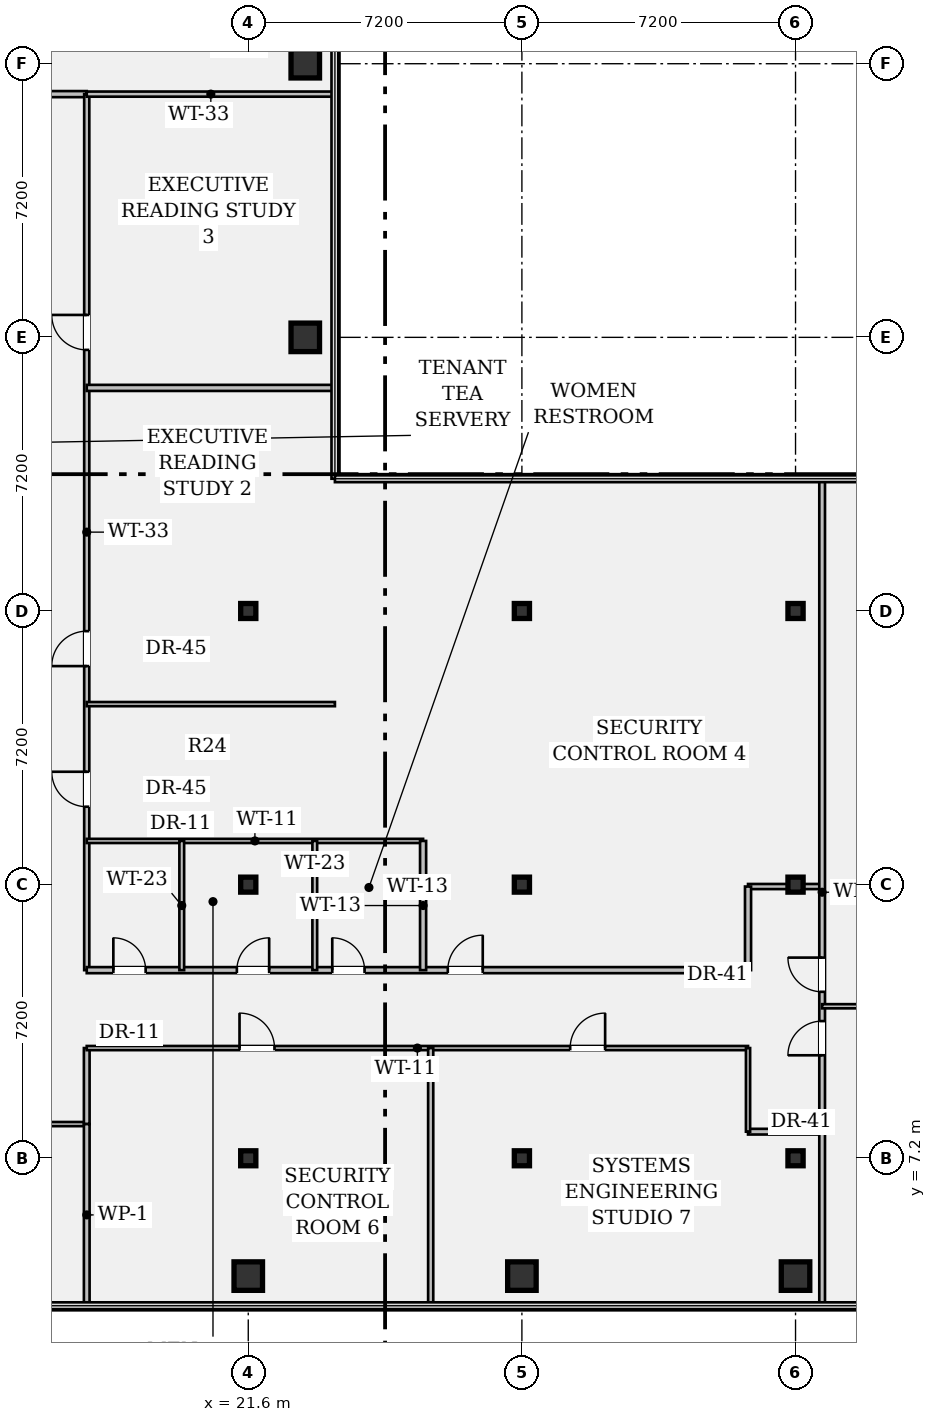
"""IFC4 building model, lengths in metres.
Left out: names, types, materials, properties, quantities, classifications, styles, units other than length and angle.
Written with IfcOpenShell. Run it as: python <this file> out.ifc"""

import sys

from ifc_helpers import new_model, si_unit, direction, frame, frame_2d, origin, origin_2d, place, context, subcontext, project, spatial, rectangle, hollow_rectangle, i_section, extrude, element, fill, save


model = new_model("IFC4")
c1 = context("Model", 3, precision=1e-05, world=origin(), true_north=direction((0.0, 1.0)))
c2 = subcontext(c1, "Body", "Model", "MODEL_VIEW")
j1 = project(units=[si_unit("LENGTHUNIT", "METRE"), si_unit("PLANEANGLEUNIT", "RADIAN")], contexts=[c1])
p1 = place(None, origin())
s1 = spatial("IfcSite", under=j1, at=p1, CompositionType="ELEMENT")
p2 = place(p1, origin())
s2 = spatial("IfcBuilding", under=s1, at=p2, CompositionType="ELEMENT")
p3 = place(p2, frame((0.0, 0.0, 229.25)))
s3 = spatial("IfcBuildingStorey", under=s2, at=p3, CompositionType="ELEMENT", Elevation=229.25)
p4 = place(p3, frame((21.6, 4.1, 0.0), z_axis=(0.0, 0.0, 1.0), x_axis=(1.0, 0.0, 0.0)))
e1 = element("IfcColumn", 1, at=p4, inside=s3, PredefinedType="COLUMN", context=c2, shape_type="SweptSolid", body=[
    extrude(hollow_rectangle(XDim=0.75, YDim=0.75, WallThickness=0.045, at=origin_2d()), origin(), (0.0, 0.0, 1.0), 3.24),
])
for number, where, z_axis, x_axis in (
    (2, (21.6, 7.2, 0.0), (0.0, 0.0, 1.0), (1.0, 0.0, 0.0)),
    (3, (21.6, 14.4, 0.0), (0.0, 0.0, 1.0), (1.0, 0.0, 0.0)),
    (4, (21.6, 21.6, 0.0), (0.0, 0.0, 1.0), (1.0, 0.0, 0.0)),
):
    element("IfcColumn", number, at=place(p3, frame(where, z_axis=z_axis, x_axis=x_axis)), inside=s3, PredefinedType="COLUMN", context=c2, shape_type="SweptSolid", body=[
        extrude(i_section(OverallWidth=0.399, OverallDepth=0.394, WebThickness=0.023, FlangeThickness=0.037, FilletRadius=0.018, at=origin_2d()), origin(), (0.0, 0.0, 1.0), 3.24),
    ])
for number, where, z_axis, x_axis in (
    (5, (23.1, 28.8, 0.0), (0.0, 0.0, 1.0), (1.0, 0.0, 0.0)),
    (6, (23.1, 36.0, 0.0), (0.0, 0.0, 1.0), (1.0, 0.0, 0.0)),
    (7, (28.8, 4.1, 0.0), (0.0, 0.0, 1.0), (1.0, 0.0, 0.0)),
):
    element("IfcColumn", number, at=place(p3, frame(where, z_axis=z_axis, x_axis=x_axis)), inside=s3, PredefinedType="COLUMN", context=c2, shape_type="SweptSolid", body=[
        extrude(hollow_rectangle(XDim=0.75, YDim=0.75, WallThickness=0.045, at=origin_2d()), origin(), (0.0, 0.0, 1.0), 3.24),
    ])
for number, where, z_axis, x_axis in (
    (8, (28.8, 7.2, 0.0), (0.0, 0.0, 1.0), (1.0, 0.0, 0.0)),
    (9, (28.8, 14.4, 0.0), (0.0, 0.0, 1.0), (1.0, 0.0, 0.0)),
    (10, (28.8, 21.6, 0.0), (0.0, 0.0, 1.0), (1.0, 0.0, 0.0)),
):
    element("IfcColumn", number, at=place(p3, frame(where, z_axis=z_axis, x_axis=x_axis)), inside=s3, PredefinedType="COLUMN", context=c2, shape_type="SweptSolid", body=[
        extrude(i_section(OverallWidth=0.399, OverallDepth=0.394, WebThickness=0.023, FlangeThickness=0.037, FilletRadius=0.018, at=origin_2d()), origin(), (0.0, 0.0, 1.0), 3.24),
    ])
p5 = place(p3, frame((36.0, 4.1, 0.0), z_axis=(0.0, 0.0, 1.0), x_axis=(1.0, 0.0, 0.0)))
e11 = element("IfcColumn", 11, at=p5, inside=s3, PredefinedType="COLUMN", context=c2, shape_type="SweptSolid", body=[
    extrude(hollow_rectangle(XDim=0.75, YDim=0.75, WallThickness=0.045, at=origin_2d()), origin(), (0.0, 0.0, 1.0), 3.24),
])
for number, where, z_axis, x_axis in (
    (12, (36.0, 7.2, 0.0), (0.0, 0.0, 1.0), (1.0, 0.0, 0.0)),
    (13, (36.0, 14.4, 0.0), (0.0, 0.0, 1.0), (1.0, 0.0, 0.0)),
    (14, (36.0, 21.6, 0.0), (0.0, 0.0, 1.0), (1.0, 0.0, 0.0)),
):
    element("IfcColumn", number, at=place(p3, frame(where, z_axis=z_axis, x_axis=x_axis)), inside=s3, PredefinedType="COLUMN", context=c2, shape_type="SweptSolid", body=[
        extrude(i_section(OverallWidth=0.399, OverallDepth=0.394, WebThickness=0.023, FlangeThickness=0.037, FilletRadius=0.018, at=origin_2d()), origin(), (0.0, 0.0, 1.0), 3.24),
    ])
p6 = place(p3, frame((14.4, 8.1, 0.0), z_axis=(0.0, 0.0, 1.0), x_axis=(1.0, 0.0, 0.0)))
e15 = element("IfcWall", 15, at=p6, inside=s3, PredefinedType="PARTITIONING", context=c2, shape_type="SweptSolid", body=[
    extrude(rectangle(XDim=2.95, YDim=0.11, at=frame_2d((1.475, 0.0))), origin(), (0.0, 0.0, 1.0), 2.808),
])
p7 = place(p6, frame((0.95, 0.0, 0.0)))
e16 = element("IfcOpeningElement", 16, at=p7, cuts=e15, PredefinedType="OPENING", context=c2, shape_type="SweptSolid", body=[
    extrude(rectangle(XDim=0.92, YDim=2.15, at=frame_2d((0.46, 1.075))), frame((0.0, 0.067, 0.0), z_axis=(0.0, -1.0, 0.0), x_axis=(1.0, 0.0, 0.0)), (0.0, 0.0, 1.0), 0.134),
])
p8 = place(p3, frame((14.4, 35.2, 0.0), z_axis=(0.0, 0.0, 1.0), x_axis=(1.0, 0.0, 0.0)))
e17 = element("IfcWall", 17, at=p8, inside=s3, PredefinedType="PARTITIONING", context=c2, shape_type="SweptSolid", body=[
    extrude(rectangle(XDim=2.95, YDim=0.16, at=frame_2d((1.475, 0.0))), origin(), (0.0, 0.0, 1.0), 2.808),
])
p9 = place(p8, frame((0.95, 0.0, 0.0)))
e18 = element("IfcOpeningElement", 18, at=p9, cuts=e17, PredefinedType="OPENING", context=c2, shape_type="SweptSolid", body=[
    extrude(rectangle(XDim=1.0, YDim=2.15, at=frame_2d((0.5, 1.075))), frame((0.0, 0.092, 0.0), z_axis=(0.0, -1.0, 0.0), x_axis=(1.0, 0.0, 0.0)), (0.0, 0.0, 1.0), 0.184),
])
p10 = place(p3, frame((17.35, 8.1, 0.0), z_axis=(0.0, 0.0, 1.0), x_axis=(0.0, 1.0, 0.0)))
e19 = element("IfcWall", 19, at=p10, inside=s3, PredefinedType="PARTITIONING", context=c2, shape_type="SweptSolid", body=[
    extrude(rectangle(XDim=2.0, YDim=0.15, at=frame_2d((1.0, 0.0))), origin(), (0.0, 0.0, 1.0), 3.24),
])
p11 = place(p3, frame((17.35, 12.15, 0.0), z_axis=(0.0, 0.0, 1.0), x_axis=(0.0, 1.0, 0.0)))
e20 = element("IfcWall", 20, at=p11, inside=s3, PredefinedType="PARTITIONING", context=c2, shape_type="SweptSolid", body=[
    extrude(rectangle(XDim=23.05, YDim=0.135, at=frame_2d((11.525, 0.0))), origin(), (0.0, 0.0, 1.0), 2.325),
])
p12 = place(p11, frame((4.3, 0.0, 0.0)))
e21 = element("IfcOpeningElement", 21, at=p12, cuts=e20, PredefinedType="OPENING", context=c2, shape_type="SweptSolid", body=[
    extrude(rectangle(XDim=0.92, YDim=2.15, at=frame_2d((0.46, 1.075))), frame((0.0, 0.08, 0.0), z_axis=(0.0, -1.0, 0.0), x_axis=(1.0, 0.0, 0.0)), (0.0, 0.0, 1.0), 0.159),
])
p13 = place(p11, frame((8.0, 0.0, 0.0)))
e22 = element("IfcOpeningElement", 22, at=p13, cuts=e20, PredefinedType="OPENING", context=c2, shape_type="SweptSolid", body=[
    extrude(rectangle(XDim=0.92, YDim=2.15, at=frame_2d((0.46, 1.075))), frame((0.0, 0.08, 0.0), z_axis=(0.0, -1.0, 0.0), x_axis=(1.0, 0.0, 0.0)), (0.0, 0.0, 1.0), 0.159),
])
p14 = place(p11, frame((16.32, 0.0, 0.0)))
e23 = element("IfcOpeningElement", 23, at=p14, cuts=e20, PredefinedType="OPENING", context=c2, shape_type="SweptSolid", body=[
    extrude(rectangle(XDim=0.92, YDim=2.15, at=frame_2d((0.46, 1.075))), frame((0.0, 0.08, 0.0), z_axis=(0.0, -1.0, 0.0), x_axis=(1.0, 0.0, 0.0)), (0.0, 0.0, 1.0), 0.159),
])
p15 = place(p3, frame((17.35, 10.1, 0.0), z_axis=(0.0, 0.0, 1.0), x_axis=(1.0, 0.0, 0.0)))
e24 = element("IfcWall", 24, at=p15, inside=s3, PredefinedType="PARTITIONING", context=c2, shape_type="SweptSolid", body=[
    extrude(rectangle(XDim=17.4, YDim=0.11, at=frame_2d((8.7, 0.0))), origin(), (0.0, 0.0, 1.0), 2.325),
])
p16 = place(p15, frame((4.02, 0.0, 0.0)))
e25 = element("IfcOpeningElement", 25, at=p16, cuts=e24, PredefinedType="OPENING", context=c2, shape_type="SweptSolid", body=[
    extrude(rectangle(XDim=0.92, YDim=2.15, at=frame_2d((0.46, 1.075))), frame((0.0, 0.067, 0.0), z_axis=(0.0, -1.0, 0.0), x_axis=(1.0, 0.0, 0.0)), (0.0, 0.0, 1.0), 0.134),
])
p17 = place(p15, frame((12.72, 0.0, 0.0)))
e26 = element("IfcOpeningElement", 26, at=p17, cuts=e24, PredefinedType="OPENING", context=c2, shape_type="SweptSolid", body=[
    extrude(rectangle(XDim=0.92, YDim=2.15, at=frame_2d((0.46, 1.075))), frame((0.0, 0.067, 0.0), z_axis=(0.0, -1.0, 0.0), x_axis=(1.0, 0.0, 0.0)), (0.0, 0.0, 1.0), 0.134),
])
p18 = place(p3, frame((17.35, 12.15, 0.0), z_axis=(0.0, 0.0, 1.0), x_axis=(1.0, 0.0, 0.0)))
e27 = element("IfcWall", 27, at=p18, inside=s3, PredefinedType="PARTITIONING", context=c2, shape_type="SweptSolid", body=[
    extrude(rectangle(XDim=17.4, YDim=0.16, at=frame_2d((8.7, 0.0))), origin(), (0.0, 0.0, 1.0), 2.325),
])
p19 = place(p18, frame((0.7, 0.0, 0.0)))
e28 = element("IfcOpeningElement", 28, at=p19, cuts=e27, PredefinedType="OPENING", context=c2, shape_type="SweptSolid", body=[
    extrude(rectangle(XDim=0.85, YDim=2.15, at=frame_2d((0.425, 1.075))), frame((0.0, 0.092, 0.0), z_axis=(0.0, -1.0, 0.0), x_axis=(1.0, 0.0, 0.0)), (0.0, 0.0, 1.0), 0.184),
])
p20 = place(p18, frame((3.95, 0.0, 0.0)))
e29 = element("IfcOpeningElement", 29, at=p20, cuts=e27, PredefinedType="OPENING", context=c2, shape_type="SweptSolid", body=[
    extrude(rectangle(XDim=0.85, YDim=2.15, at=frame_2d((0.425, 1.075))), frame((0.0, 0.092, 0.0), z_axis=(0.0, -1.0, 0.0), x_axis=(1.0, 0.0, 0.0)), (0.0, 0.0, 1.0), 0.184),
])
p21 = place(p18, frame((6.46, 0.0, 0.0)))
e30 = element("IfcOpeningElement", 30, at=p21, cuts=e27, PredefinedType="OPENING", context=c2, shape_type="SweptSolid", body=[
    extrude(rectangle(XDim=0.85, YDim=2.15, at=frame_2d((0.425, 1.075))), frame((0.0, 0.092, 0.0), z_axis=(0.0, -1.0, 0.0), x_axis=(1.0, 0.0, 0.0)), (0.0, 0.0, 1.0), 0.184),
])
p22 = place(p18, frame((9.5, 0.0, 0.0)))
e31 = element("IfcOpeningElement", 31, at=p22, cuts=e27, PredefinedType="OPENING", context=c2, shape_type="SweptSolid", body=[
    extrude(rectangle(XDim=0.92, YDim=2.15, at=frame_2d((0.46, 1.075))), frame((0.0, 0.092, 0.0), z_axis=(0.0, -1.0, 0.0), x_axis=(1.0, 0.0, 0.0)), (0.0, 0.0, 1.0), 0.184),
])
p23 = place(p3, frame((34.75, 7.9, 0.0), z_axis=(0.0, 0.0, 1.0), x_axis=(1.0, 0.0, 0.0)))
e32 = element("IfcWall", 32, at=p23, inside=s3, PredefinedType="PARTITIONING", context=c2, shape_type="SweptSolid", body=[
    extrude(rectangle(XDim=1.95, YDim=0.15, at=frame_2d((0.975, 0.0))), origin(), (0.0, 0.0, 1.0), 2.325),
])
p24 = place(p3, frame((34.75, 14.35, 0.0), z_axis=(0.0, 0.0, 1.0), x_axis=(1.0, 0.0, 0.0)))
e33 = element("IfcWall", 33, at=p24, inside=s3, PredefinedType="PARTITIONING", context=c2, shape_type="SweptSolid", body=[
    extrude(rectangle(XDim=1.95, YDim=0.135, at=frame_2d((0.975, 0.0))), origin(), (0.0, 0.0, 1.0), 2.325),
])
p25 = place(p3, frame((34.75, 7.9, 0.0), z_axis=(0.0, 0.0, 1.0), x_axis=(0.0, 1.0, 0.0)))
e34 = element("IfcWall", 34, at=p25, inside=s3, PredefinedType="PARTITIONING", context=c2, shape_type="SweptSolid", body=[
    extrude(rectangle(XDim=2.2, YDim=0.11, at=frame_2d((1.1, 0.0))), origin(), (0.0, 0.0, 1.0), 3.24),
])
p26 = place(p3, frame((34.75, 12.15, 0.0), z_axis=(0.0, 0.0, 1.0), x_axis=(0.0, 1.0, 0.0)))
e35 = element("IfcWall", 35, at=p26, inside=s3, PredefinedType="PARTITIONING", context=c2, shape_type="SweptSolid", body=[
    extrude(rectangle(XDim=2.2, YDim=0.16, at=frame_2d((1.1, 0.0))), origin(), (0.0, 0.0, 1.0), 3.24),
])
p27 = place(p3, frame((36.7, 3.32, 0.0), z_axis=(0.0, 0.0, 1.0), x_axis=(0.0, 1.0, 0.0)))
e36 = element("IfcWall", 36, at=p27, inside=s3, PredefinedType="PARTITIONING", context=c2, shape_type="SweptSolid", body=[
    extrude(rectangle(XDim=21.76, YDim=0.15, at=frame_2d((10.88, 0.0))), origin(), (0.0, 0.0, 1.0), 2.325),
])
p28 = place(p27, frame((6.59, 0.0, 0.0)))
e37 = element("IfcOpeningElement", 37, at=p28, cuts=e36, PredefinedType="OPENING", context=c2, shape_type="SweptSolid", body=[
    extrude(rectangle(XDim=0.9, YDim=2.15, at=frame_2d((0.45, 1.075))), frame((0.0, 0.087, 0.0), z_axis=(0.0, -1.0, 0.0), x_axis=(1.0, 0.0, 0.0)), (0.0, 0.0, 1.0), 0.174),
])
p29 = place(p27, frame((8.26, 0.0, 0.0)))
e38 = element("IfcOpeningElement", 38, at=p29, cuts=e36, PredefinedType="OPENING", context=c2, shape_type="SweptSolid", body=[
    extrude(rectangle(XDim=0.9, YDim=2.15, at=frame_2d((0.45, 1.075))), frame((0.0, 0.087, 0.0), z_axis=(0.0, -1.0, 0.0), x_axis=(1.0, 0.0, 0.0)), (0.0, 0.0, 1.0), 0.174),
])
p30 = place(p3, frame((17.35, 35.2, 0.0), z_axis=(0.0, 0.0, 1.0), x_axis=(1.0, 0.0, 0.0)))
e39 = element("IfcWall", 39, at=p30, inside=s3, PredefinedType="PARTITIONING", context=c2, shape_type="SweptSolid", body=[
    extrude(rectangle(XDim=6.53, YDim=0.135, at=frame_2d((3.265, 0.0))), origin(), (0.0, 0.0, 1.0), 2.808),
])
p31 = place(p3, frame((17.35, 15.55, 0.0), z_axis=(0.0, 0.0, 1.0), x_axis=(1.0, 0.0, 0.0)))
e40 = element("IfcWall", 40, at=p31, inside=s3, PredefinedType="PARTITIONING", context=c2, shape_type="SweptSolid", body=[
    extrude(rectangle(XDim=8.85, YDim=0.11, at=frame_2d((4.425, 0.0))), origin(), (0.0, 0.0, 1.0), 2.613),
])
p32 = place(p3, frame((26.2, 12.15, 0.0), z_axis=(0.0, 0.0, 1.0), x_axis=(0.0, 1.0, 0.0)))
e41 = element("IfcWall", 41, at=p32, inside=s3, PredefinedType="PARTITIONING", context=c2, shape_type="SweptSolid", body=[
    extrude(rectangle(XDim=3.4, YDim=0.16, at=frame_2d((1.7, 0.0))), origin(), (0.0, 0.0, 1.0), 2.613),
])
for number, where, z_axis, x_axis in (
    (42, (19.85, 12.15, 0.0), (0.0, 0.0, 1.0), (0.0, 1.0, 0.0)),
    (43, (23.35, 12.15, 0.0), (0.0, 0.0, 1.0), (0.0, 1.0, 0.0)),
):
    element("IfcWall", number, at=place(p3, frame(where, z_axis=z_axis, x_axis=x_axis)), inside=s3, PredefinedType="PARTITIONING", context=c2, shape_type="SweptSolid", body=[
        extrude(rectangle(XDim=3.4, YDim=0.125, at=frame_2d((1.7, 0.0))), origin(), (0.0, 0.0, 1.0), 2.613),
    ])
p33 = place(p3, frame((17.35, 19.15, 0.0), z_axis=(0.0, 0.0, 1.0), x_axis=(1.0, 0.0, 0.0)))
e44 = element("IfcWall", 44, at=p33, inside=s3, PredefinedType="PARTITIONING", context=c2, shape_type="SweptSolid", body=[
    extrude(rectangle(XDim=6.53, YDim=0.11, at=frame_2d((3.265, 0.0))), origin(), (0.0, 0.0, 1.0), 2.613),
])
p34 = place(p3, frame((17.35, 27.47, 0.0), z_axis=(0.0, 0.0, 1.0), x_axis=(1.0, 0.0, 0.0)))
e45 = element("IfcWall", 45, at=p34, inside=s3, PredefinedType="PARTITIONING", context=c2, shape_type="SweptSolid", body=[
    extrude(rectangle(XDim=6.53, YDim=0.16, at=frame_2d((3.265, 0.0))), origin(), (0.0, 0.0, 1.0), 2.808),
])
p35 = place(p3, frame((17.35, 3.32, 0.0), z_axis=(0.0, 0.0, 1.0), x_axis=(0.0, 1.0, 0.0)))
e46 = element("IfcWall", 46, at=p35, inside=s3, PredefinedType="PARTITIONING", context=c2, shape_type="SweptSolid", body=[
    extrude(rectangle(XDim=4.78, YDim=0.15, at=frame_2d((2.39, 0.0))), origin(), (0.0, 0.0, 1.0), 2.808),
])
p36 = place(p3, frame((26.4, 3.32, 0.0), z_axis=(0.0, 0.0, 1.0), x_axis=(0.0, 1.0, 0.0)))
e47 = element("IfcWall", 47, at=p36, inside=s3, PredefinedType="PARTITIONING", context=c2, shape_type="SweptSolid", body=[
    extrude(rectangle(XDim=6.78, YDim=0.135, at=frame_2d((3.39, 0.0))), origin(), (0.0, 0.0, 1.0), 2.808),
])
p37 = place(p3, frame((36.7, 11.2, 0.0), z_axis=(0.0, 0.0, 1.0), x_axis=(1.0, 0.0, 0.0)))
e48 = element("IfcWall", 48, at=p37, inside=s3, PredefinedType="PARTITIONING", context=c2, shape_type="SweptSolid", body=[
    extrude(rectangle(XDim=7.18, YDim=0.11, at=frame_2d((3.59, 0.0))), origin(), (0.0, 0.0, 1.0), 3.24),
])
p38 = place(p19, origin())
e49 = element("IfcDoor", 49, at=p38, inside=s3, OperationType="SINGLE_SWING_LEFT", PredefinedType="DOOR", context=c2, shape_type="SweptSolid", body=[
    extrude(rectangle(XDim=0.85, YDim=2.15, at=frame_2d((0.425, 1.075))), frame((0.0, 0.025, 0.0), z_axis=(0.0, -1.0, 0.0), x_axis=(1.0, 0.0, 0.0)), (0.0, 0.0, 1.0), 0.05),
])
fill(e28, e49)
p39 = place(p20, origin())
e50 = element("IfcDoor", 50, at=p39, inside=s3, OperationType="SINGLE_SWING_RIGHT", PredefinedType="DOOR", context=c2, shape_type="SweptSolid", body=[
    extrude(rectangle(XDim=0.85, YDim=2.15, at=frame_2d((0.425, 1.075))), frame((0.0, 0.025, 0.0), z_axis=(0.0, -1.0, 0.0), x_axis=(1.0, 0.0, 0.0)), (0.0, 0.0, 1.0), 0.05),
])
fill(e29, e50)
p40 = place(p21, origin())
e51 = element("IfcDoor", 51, at=p40, inside=s3, OperationType="SINGLE_SWING_LEFT", PredefinedType="DOOR", context=c2, shape_type="SweptSolid", body=[
    extrude(rectangle(XDim=0.85, YDim=2.15, at=frame_2d((0.425, 1.075))), frame((0.0, 0.025, 0.0), z_axis=(0.0, -1.0, 0.0), x_axis=(1.0, 0.0, 0.0)), (0.0, 0.0, 1.0), 0.05),
])
fill(e30, e51)
p41 = place(p12, origin())
e52 = element("IfcDoor", 52, at=p41, inside=s3, OperationType="SINGLE_SWING_RIGHT", PredefinedType="DOOR", context=c2, shape_type="SweptSolid", body=[
    extrude(rectangle(XDim=0.92, YDim=2.15, at=frame_2d((0.46, 1.075))), frame((0.0, 0.025, 0.0), z_axis=(0.0, -1.0, 0.0), x_axis=(1.0, 0.0, 0.0)), (0.0, 0.0, 1.0), 0.05),
])
fill(e21, e52)
p42 = place(p13, origin())
e53 = element("IfcDoor", 53, at=p42, inside=s3, OperationType="SINGLE_SWING_LEFT", PredefinedType="DOOR", context=c2, shape_type="SweptSolid", body=[
    extrude(rectangle(XDim=0.92, YDim=2.15, at=frame_2d((0.46, 1.075))), frame((0.0, 0.025, 0.0), z_axis=(0.0, -1.0, 0.0), x_axis=(1.0, 0.0, 0.0)), (0.0, 0.0, 1.0), 0.05),
])
fill(e22, e53)
p43 = place(p14, origin())
e54 = element("IfcDoor", 54, at=p43, inside=s3, OperationType="SINGLE_SWING_RIGHT", PredefinedType="DOOR", context=c2, shape_type="SweptSolid", body=[
    extrude(rectangle(XDim=0.92, YDim=2.15, at=frame_2d((0.46, 1.075))), frame((0.0, 0.025, 0.0), z_axis=(0.0, -1.0, 0.0), x_axis=(1.0, 0.0, 0.0)), (0.0, 0.0, 1.0), 0.05),
])
fill(e23, e54)
p44 = place(p22, origin())
e55 = element("IfcDoor", 55, at=p44, inside=s3, OperationType="SINGLE_SWING_RIGHT", PredefinedType="DOOR", context=c2, shape_type="SweptSolid", body=[
    extrude(rectangle(XDim=0.92, YDim=2.15, at=frame_2d((0.46, 1.075))), frame((0.0, 0.025, 0.0), z_axis=(0.0, -1.0, 0.0), x_axis=(1.0, 0.0, 0.0)), (0.0, 0.0, 1.0), 0.05),
])
fill(e31, e55)
p45 = place(p16, origin())
e56 = element("IfcDoor", 56, at=p45, inside=s3, OperationType="SINGLE_SWING_LEFT", PredefinedType="DOOR", context=c2, shape_type="SweptSolid", body=[
    extrude(rectangle(XDim=0.92, YDim=2.15, at=frame_2d((0.46, 1.075))), frame((0.0, 0.025, 0.0), z_axis=(0.0, -1.0, 0.0), x_axis=(1.0, 0.0, 0.0)), (0.0, 0.0, 1.0), 0.05),
])
fill(e25, e56)
p46 = place(p17, origin())
e57 = element("IfcDoor", 57, at=p46, inside=s3, OperationType="SINGLE_SWING_RIGHT", PredefinedType="DOOR", context=c2, shape_type="SweptSolid", body=[
    extrude(rectangle(XDim=0.92, YDim=2.15, at=frame_2d((0.46, 1.075))), frame((0.0, 0.025, 0.0), z_axis=(0.0, -1.0, 0.0), x_axis=(1.0, 0.0, 0.0)), (0.0, 0.0, 1.0), 0.05),
])
fill(e26, e57)
p47 = place(p28, origin())
e58 = element("IfcDoor", 58, at=p47, inside=s3, OperationType="SINGLE_SWING_LEFT", PredefinedType="DOOR", context=c2, shape_type="SweptSolid", body=[
    extrude(rectangle(XDim=0.9, YDim=2.15, at=frame_2d((0.45, 1.075))), frame((0.0, 0.025, 0.0), z_axis=(0.0, -1.0, 0.0), x_axis=(1.0, 0.0, 0.0)), (0.0, 0.0, 1.0), 0.05),
])
fill(e37, e58)
p48 = place(p29, origin())
e59 = element("IfcDoor", 59, at=p48, inside=s3, OperationType="SINGLE_SWING_RIGHT", PredefinedType="DOOR", context=c2, shape_type="SweptSolid", body=[
    extrude(rectangle(XDim=0.9, YDim=2.15, at=frame_2d((0.45, 1.075))), frame((0.0, 0.025, 0.0), z_axis=(0.0, -1.0, 0.0), x_axis=(1.0, 0.0, 0.0)), (0.0, 0.0, 1.0), 0.05),
])
fill(e38, e59)
save(model, sys.argv[1])
